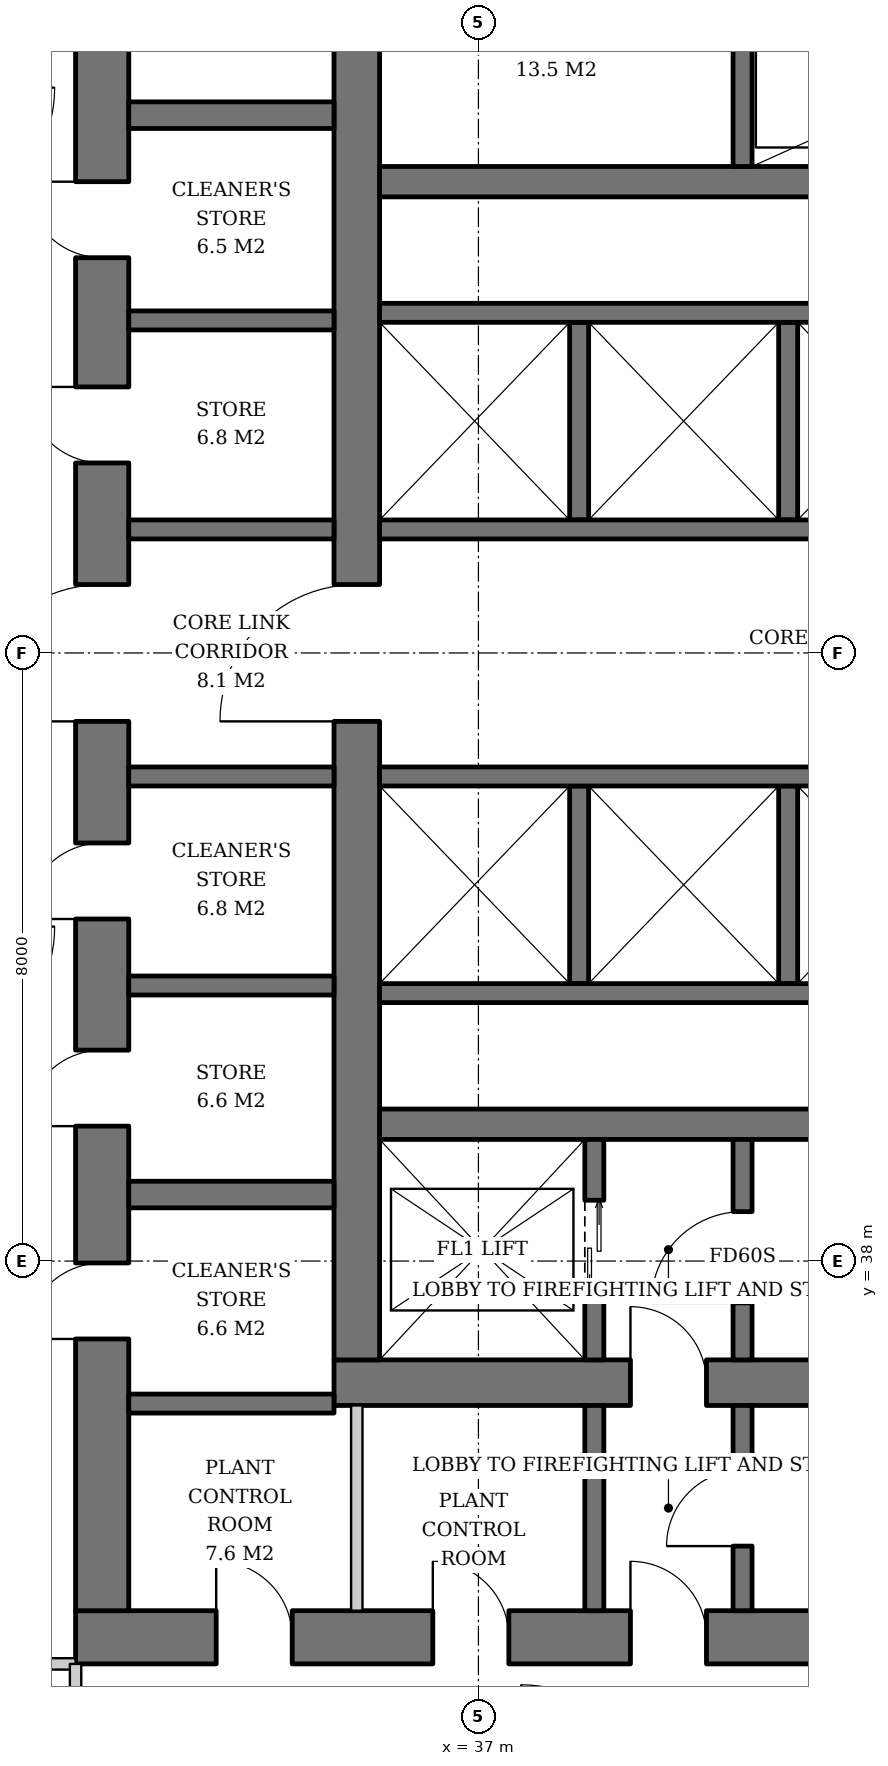
"""IFC4 building model, lengths in metres.
Left out: names, types, materials, properties, quantities, classifications, styles, units other than length and angle.
Written with IfcOpenShell. Run it as: python <this file> out.ifc"""

import sys

from ifc_helpers import new_model, si_unit, direction, frame, frame_2d, origin, origin_2d, place, context, subcontext, project, spatial, rectangle, extrude, element, fill, save


model = new_model("IFC4")
c1 = context("Model", 3, precision=1e-05, world=origin(), true_north=direction((0.0, 1.0)))
c2 = subcontext(c1, "Body", "Model", "MODEL_VIEW")
j1 = project(units=[si_unit("LENGTHUNIT", "METRE"), si_unit("PLANEANGLEUNIT", "RADIAN")], contexts=[c1])
p1 = place(None, origin())
s1 = spatial("IfcSite", under=j1, at=p1, CompositionType="ELEMENT")
p2 = place(p1, origin())
s2 = spatial("IfcBuilding", under=s1, at=p2, CompositionType="ELEMENT")
p3 = place(p2, frame((0.0, 0.0, 157.8)))
s3 = spatial("IfcBuildingStorey", under=s2, at=p3, CompositionType="ELEMENT", Elevation=157.8)
p4 = place(p3, frame((29.471, 30.471, 0.0), z_axis=(0.031898107953, 0.031898107953, 0.998981992539), x_axis=(-0.707106781187, 0.707106781187, 0.0)))
e1 = element("IfcColumn", 1, at=p4, inside=s3, PredefinedType="COLUMN", context=c2, shape_type="SweptSolid", body=[
    extrude(rectangle(XDim=2.6, YDim=2.6, at=origin_2d()), origin(), (0.0, 0.0, 1.0), 3.804),
])
p5 = place(p3, frame((35.1, 36.4, 0.0), z_axis=(0.0, 0.0, 1.0), x_axis=(1.0, 0.0, 0.0)))
e2 = element("IfcWall", 2, at=p5, inside=s3, PredefinedType="SHEAR", context=c2, shape_type="SweptSolid", body=[
    extrude(rectangle(XDim=19.8, YDim=0.6, at=frame_2d((9.9, 0.0))), origin(), (0.0, 0.0, 1.0), 3.8),
])
p6 = place(p5, frame((3.9, 0.0, 0.0)))
e3 = element("IfcOpeningElement", 3, at=p6, cuts=e2, PredefinedType="OPENING", context=c2, shape_type="SweptSolid", body=[
    extrude(rectangle(XDim=1.0, YDim=2.1, at=frame_2d((0.5, 1.05))), frame((0.0, 0.31, 0.0), z_axis=(0.0, -1.0, 0.0), x_axis=(1.0, 0.0, 0.0)), (0.0, 0.0, 1.0), 0.62),
])
p7 = place(p5, frame((15.35, 0.0, 0.0)))
e4 = element("IfcOpeningElement", 4, at=p7, cuts=e2, PredefinedType="OPENING", context=c2, shape_type="SweptSolid", body=[
    extrude(rectangle(XDim=1.0, YDim=2.1, at=frame_2d((0.5, 1.05))), frame((0.0, 0.31, 0.0), z_axis=(0.0, -1.0, 0.0), x_axis=(1.0, 0.0, 0.0)), (0.0, 0.0, 1.0), 0.62),
])
p8 = place(p3, frame((35.4, 36.7, 0.0), z_axis=(0.0, 0.0, 1.0), x_axis=(0.0, 1.0, 0.0)))
e5 = element("IfcWall", 5, at=p8, inside=s3, PredefinedType="SHEAR", context=c2, shape_type="SweptSolid", body=[
    extrude(rectangle(XDim=18.6, YDim=0.6, at=frame_2d((9.3, 0.0))), origin(), (0.0, 0.0, 1.0), 3.8),
])
p9 = place(p8, frame((8.4, 0.0, 0.0)))
e6 = element("IfcOpeningElement", 6, at=p9, cuts=e5, PredefinedType="OPENING", context=c2, shape_type="SweptSolid", body=[
    extrude(rectangle(XDim=1.8, YDim=2.4, at=frame_2d((0.9, 1.2))), frame((0.0, 0.31, 0.0), z_axis=(0.0, -1.0, 0.0), x_axis=(1.0, 0.0, 0.0)), (0.0, 0.0, 1.0), 0.62),
])
p10 = place(p3, frame((31.7, 33.05, 0.0), z_axis=(0.0, 0.0, 1.0), x_axis=(1.0, 0.0, 0.0)))
e7 = element("IfcWall", 7, at=p10, inside=s3, PredefinedType="SHEAR", context=c2, shape_type="SweptSolid", body=[
    extrude(rectangle(XDim=26.6, YDim=0.7, at=frame_2d((13.3, 0.0))), origin(), (0.0, 0.0, 1.0), 3.8),
])
p11 = place(p10, frame((7.3, 0.0, 0.0)))
e8 = element("IfcOpeningElement", 8, at=p11, cuts=e7, PredefinedType="OPENING", context=c2, shape_type="SweptSolid", body=[
    extrude(rectangle(XDim=1.0, YDim=2.1, at=frame_2d((0.5, 1.05))), frame((0.0, 0.36, 0.0), z_axis=(0.0, -1.0, 0.0), x_axis=(1.0, 0.0, 0.0)), (0.0, 0.0, 1.0), 0.72),
])
p12 = place(p10, frame((18.75, 0.0, 0.0)))
e9 = element("IfcOpeningElement", 9, at=p12, cuts=e7, PredefinedType="OPENING", context=c2, shape_type="SweptSolid", body=[
    extrude(rectangle(XDim=1.0, YDim=2.1, at=frame_2d((0.5, 1.05))), frame((0.0, 0.36, 0.0), z_axis=(0.0, -1.0, 0.0), x_axis=(1.0, 0.0, 0.0)), (0.0, 0.0, 1.0), 0.72),
])
p13 = place(p10, frame((1.85, 0.0, 0.0)))
e10 = element("IfcOpeningElement", 10, at=p13, cuts=e7, PredefinedType="OPENING", context=c2, shape_type="SweptSolid", body=[
    extrude(rectangle(XDim=1.0, YDim=2.1, at=frame_2d((0.5, 1.05))), frame((0.0, 0.36, 0.0), z_axis=(0.0, -1.0, 0.0), x_axis=(1.0, 0.0, 0.0)), (0.0, 0.0, 1.0), 0.72),
])
p14 = place(p10, frame((4.7, 0.0, 0.0)))
e11 = element("IfcOpeningElement", 11, at=p14, cuts=e7, PredefinedType="OPENING", context=c2, shape_type="SweptSolid", body=[
    extrude(rectangle(XDim=1.0, YDim=2.1, at=frame_2d((0.5, 1.05))), frame((0.0, 0.36, 0.0), z_axis=(0.0, -1.0, 0.0), x_axis=(1.0, 0.0, 0.0)), (0.0, 0.0, 1.0), 0.72),
])
p15 = place(p3, frame((32.05, 33.4, 0.0), z_axis=(0.0, 0.0, 1.0), x_axis=(0.0, 1.0, 0.0)))
e12 = element("IfcWall", 12, at=p15, inside=s3, PredefinedType="SHEAR", context=c2, shape_type="SweptSolid", body=[
    extrude(rectangle(XDim=25.2, YDim=0.7, at=frame_2d((12.6, 0.0))), origin(), (0.0, 0.0, 1.0), 3.8),
])
p16 = place(p15, frame((11.7, 0.0, 0.0)))
e13 = element("IfcOpeningElement", 13, at=p16, cuts=e12, PredefinedType="OPENING", context=c2, shape_type="SweptSolid", body=[
    extrude(rectangle(XDim=1.8, YDim=2.4, at=frame_2d((0.9, 1.2))), frame((0.0, 0.36, 0.0), z_axis=(0.0, -1.0, 0.0), x_axis=(1.0, 0.0, 0.0)), (0.0, 0.0, 1.0), 0.72),
])
p17 = place(p15, frame((3.575, 0.0, 0.0)))
e14 = element("IfcOpeningElement", 14, at=p17, cuts=e12, PredefinedType="OPENING", context=c2, shape_type="SweptSolid", body=[
    extrude(rectangle(XDim=1.0, YDim=2.1, at=frame_2d((0.5, 1.05))), frame((0.0, 0.36, 0.0), z_axis=(0.0, -1.0, 0.0), x_axis=(1.0, 0.0, 0.0)), (0.0, 0.0, 1.0), 0.72),
])
p18 = place(p15, frame((6.375, 0.0, 0.0)))
e15 = element("IfcOpeningElement", 15, at=p18, cuts=e12, PredefinedType="OPENING", context=c2, shape_type="SweptSolid", body=[
    extrude(rectangle(XDim=1.0, YDim=2.1, at=frame_2d((0.5, 1.05))), frame((0.0, 0.36, 0.0), z_axis=(0.0, -1.0, 0.0), x_axis=(1.0, 0.0, 0.0)), (0.0, 0.0, 1.0), 0.72),
])
p19 = place(p15, frame((9.1, 0.0, 0.0)))
e16 = element("IfcOpeningElement", 16, at=p19, cuts=e12, PredefinedType="OPENING", context=c2, shape_type="SweptSolid", body=[
    extrude(rectangle(XDim=1.0, YDim=2.1, at=frame_2d((0.5, 1.05))), frame((0.0, 0.36, 0.0), z_axis=(0.0, -1.0, 0.0), x_axis=(1.0, 0.0, 0.0)), (0.0, 0.0, 1.0), 0.72),
])
p20 = place(p15, frame((15.1, 0.0, 0.0)))
e17 = element("IfcOpeningElement", 17, at=p20, cuts=e12, PredefinedType="OPENING", context=c2, shape_type="SweptSolid", body=[
    extrude(rectangle(XDim=1.0, YDim=2.1, at=frame_2d((0.5, 1.05))), frame((0.0, 0.36, 0.0), z_axis=(0.0, -1.0, 0.0), x_axis=(1.0, 0.0, 0.0)), (0.0, 0.0, 1.0), 0.72),
])
p21 = place(p15, frame((17.8, 0.0, 0.0)))
e18 = element("IfcOpeningElement", 18, at=p21, cuts=e12, PredefinedType="OPENING", context=c2, shape_type="SweptSolid", body=[
    extrude(rectangle(XDim=1.0, YDim=2.1, at=frame_2d((0.5, 1.05))), frame((0.0, 0.36, 0.0), z_axis=(0.0, -1.0, 0.0), x_axis=(1.0, 0.0, 0.0)), (0.0, 0.0, 1.0), 0.72),
])
for number, where, z_axis, x_axis in (
    (19, (35.7, 39.8, 0.0), (0.0, 0.0, 1.0), (1.0, 0.0, 0.0)),
    (20, (35.7, 52.2, 0.0), (0.0, 0.0, 1.0), (1.0, 0.0, 0.0)),
):
    element("IfcWall", number, at=place(p3, frame(where, z_axis=z_axis, x_axis=x_axis)), inside=s3, PredefinedType="SHEAR", context=c2, shape_type="SweptSolid", body=[
        extrude(rectangle(XDim=18.6, YDim=0.4, at=frame_2d((9.3, 0.0))), origin(), (0.0, 0.0, 1.0), 3.8),
    ])
p22 = place(p3, frame((38.525, 36.7, 0.0), z_axis=(0.0, 0.0, 1.0), x_axis=(0.0, 1.0, 0.0)))
e21 = element("IfcWall", 21, at=p22, inside=s3, PredefinedType="SHEAR", context=c2, shape_type="SweptSolid", body=[
    extrude(rectangle(XDim=2.9, YDim=0.25, at=frame_2d((1.45, 0.0))), origin(), (0.0, 0.0, 1.0), 3.8),
])
p23 = place(p22, frame((0.8, 0.0, 0.0)))
e22 = element("IfcOpeningElement", 22, at=p23, cuts=e21, PredefinedType="OPENING", context=c2, shape_type="SweptSolid", body=[
    extrude(rectangle(XDim=1.3, YDim=2.2, at=frame_2d((0.65, 1.1))), frame((0.0, 0.135, 0.0), z_axis=(0.0, -1.0, 0.0), x_axis=(1.0, 0.0, 0.0)), (0.0, 0.0, 1.0), 0.27),
])
p24 = place(p3, frame((40.475, 36.7, 0.0), z_axis=(0.0, 0.0, 1.0), x_axis=(0.0, 1.0, 0.0)))
e23 = element("IfcWall", 23, at=p24, inside=s3, PredefinedType="SHEAR", context=c2, shape_type="SweptSolid", body=[
    extrude(rectangle(XDim=2.9, YDim=0.25, at=frame_2d((1.45, 0.0))), origin(), (0.0, 0.0, 1.0), 3.8),
])
p25 = place(p24, frame((0.75, 0.0, 0.0)))
e24 = element("IfcOpeningElement", 24, at=p25, cuts=e23, PredefinedType="OPENING", context=c2, shape_type="SweptSolid", body=[
    extrude(rectangle(XDim=1.2, YDim=2.1, at=frame_2d((0.6, 1.05))), frame((0.0, 0.135, 0.0), z_axis=(0.0, -1.0, 0.0), x_axis=(1.0, 0.0, 0.0)), (0.0, 0.0, 1.0), 0.27),
])
p26 = place(p3, frame((40.475, 52.4, 0.0), z_axis=(0.0, 0.0, 1.0), x_axis=(0.0, 1.0, 0.0)))
e25 = element("IfcWall", 25, at=p26, inside=s3, PredefinedType="SHEAR", context=c2, shape_type="SweptSolid", body=[
    extrude(rectangle(XDim=2.9, YDim=0.25, at=frame_2d((1.45, 0.0))), origin(), (0.0, 0.0, 1.0), 3.8),
])
for number, where, z_axis, x_axis in (
    (26, (38.325, 47.75, 0.0), (0.0, 0.0, 1.0), (0.0, 1.0, 0.0)),
    (27, (41.075, 47.75, 0.0), (0.0, 0.0, 1.0), (0.0, 1.0, 0.0)),
):
    element("IfcWall", number, at=place(p3, frame(where, z_axis=z_axis, x_axis=x_axis)), inside=s3, PredefinedType="SHEAR", context=c2, shape_type="SweptSolid", body=[
        extrude(rectangle(XDim=2.6, YDim=0.25, at=frame_2d((1.3, 0.0))), origin(), (0.0, 0.0, 1.0), 3.8),
    ])
p27 = place(p3, frame((35.7, 50.475, 0.0), z_axis=(0.0, 0.0, 1.0), x_axis=(1.0, 0.0, 0.0)))
e28 = element("IfcWall", 28, at=p27, inside=s3, PredefinedType="SHEAR", context=c2, shape_type="SweptSolid", body=[
    extrude(rectangle(XDim=11.0, YDim=0.25, at=frame_2d((5.5, 0.0))), origin(), (0.0, 0.0, 1.0), 3.8),
])
p28 = place(p3, frame((35.7, 47.625, 0.0), z_axis=(0.0, 0.0, 1.0), x_axis=(1.0, 0.0, 0.0)))
e29 = element("IfcWall", 29, at=p28, inside=s3, PredefinedType="SHEAR", context=c2, shape_type="SweptSolid", body=[
    extrude(rectangle(XDim=12.83, YDim=0.25, at=frame_2d((6.415, 0.0))), origin(), (0.0, 0.0, 1.0), 3.8),
])
p29 = place(p28, frame((11.515, 0.0, 0.0)))
e30 = element("IfcOpeningElement", 30, at=p29, cuts=e29, PredefinedType="OPENING", context=c2, shape_type="SweptSolid", body=[
    extrude(rectangle(XDim=0.8, YDim=2.0, at=frame_2d((0.4, 1.0))), frame((0.0, 0.135, 0.0), z_axis=(0.0, -1.0, 0.0), x_axis=(1.0, 0.0, 0.0)), (0.0, 0.0, 1.0), 0.27),
])
for number, where, z_axis, x_axis in (
    (31, (38.325, 44.25, 0.0), (0.0, 0.0, 1.0), (0.0, -1.0, 0.0)),
    (32, (41.075, 44.25, 0.0), (0.0, 0.0, 1.0), (0.0, -1.0, 0.0)),
):
    element("IfcWall", number, at=place(p3, frame(where, z_axis=z_axis, x_axis=x_axis)), inside=s3, PredefinedType="SHEAR", context=c2, shape_type="SweptSolid", body=[
        extrude(rectangle(XDim=2.6, YDim=0.25, at=frame_2d((1.3, 0.0))), origin(), (0.0, 0.0, 1.0), 3.8),
    ])
p30 = place(p3, frame((35.7, 41.525, 0.0), z_axis=(0.0, 0.0, 1.0), x_axis=(1.0, 0.0, 0.0)))
e33 = element("IfcWall", 33, at=p30, inside=s3, PredefinedType="SHEAR", context=c2, shape_type="SweptSolid", body=[
    extrude(rectangle(XDim=11.0, YDim=0.25, at=frame_2d((5.5, 0.0))), origin(), (0.0, 0.0, 1.0), 3.8),
])
p31 = place(p3, frame((35.7, 44.375, 0.0), z_axis=(0.0, 0.0, 1.0), x_axis=(1.0, 0.0, 0.0)))
e34 = element("IfcWall", 34, at=p31, inside=s3, PredefinedType="SHEAR", context=c2, shape_type="SweptSolid", body=[
    extrude(rectangle(XDim=12.83, YDim=0.25, at=frame_2d((6.415, 0.0))), origin(), (0.0, 0.0, 1.0), 3.8),
])
p32 = place(p31, frame((11.515, 0.0, 0.0)))
e35 = element("IfcOpeningElement", 35, at=p32, cuts=e34, PredefinedType="OPENING", context=c2, shape_type="SweptSolid", body=[
    extrude(rectangle(XDim=0.8, YDim=2.0, at=frame_2d((0.4, 1.0))), frame((0.0, 0.135, 0.0), z_axis=(0.0, -1.0, 0.0), x_axis=(1.0, 0.0, 0.0)), (0.0, 0.0, 1.0), 0.27),
])
p33 = place(p3, frame((32.4, 36.125, 0.0), z_axis=(0.0, 0.0, 1.0), x_axis=(1.0, 0.0, 0.0)))
e36 = element("IfcWall", 36, at=p33, inside=s3, PredefinedType="SHEAR", context=c2, shape_type="SweptSolid", body=[
    extrude(rectangle(XDim=2.7, YDim=0.25, at=frame_2d((1.35, 0.0))), origin(), (0.0, 0.0, 1.0), 3.8),
])
p34 = place(p3, frame((32.4, 38.875, 0.0), z_axis=(0.0, 0.0, 1.0), x_axis=(1.0, 0.0, 0.0)))
e37 = element("IfcWall", 37, at=p34, inside=s3, PredefinedType="SHEAR", context=c2, shape_type="SweptSolid", body=[
    extrude(rectangle(XDim=2.7, YDim=0.35, at=frame_2d((1.35, 0.0))), origin(), (0.0, 0.0, 1.0), 3.8),
])
for number, where, z_axis, x_axis in (
    (38, (32.4, 41.625, 0.0), (0.0, 0.0, 1.0), (1.0, 0.0, 0.0)),
    (39, (32.4, 44.375, 0.0), (0.0, 0.0, 1.0), (1.0, 0.0, 0.0)),
    (40, (32.4, 47.625, 0.0), (0.0, 0.0, 1.0), (1.0, 0.0, 0.0)),
    (41, (32.4, 50.375, 0.0), (0.0, 0.0, 1.0), (1.0, 0.0, 0.0)),
):
    element("IfcWall", number, at=place(p3, frame(where, z_axis=z_axis, x_axis=x_axis)), inside=s3, PredefinedType="SHEAR", context=c2, shape_type="SweptSolid", body=[
        extrude(rectangle(XDim=2.7, YDim=0.25, at=frame_2d((1.35, 0.0))), origin(), (0.0, 0.0, 1.0), 3.8),
    ])
p35 = place(p3, frame((32.4, 53.075, 0.0), z_axis=(0.0, 0.0, 1.0), x_axis=(1.0, 0.0, 0.0)))
e42 = element("IfcWall", 42, at=p35, inside=s3, PredefinedType="SHEAR", context=c2, shape_type="SweptSolid", body=[
    extrude(rectangle(XDim=2.7, YDim=0.35, at=frame_2d((1.35, 0.0))), origin(), (0.0, 0.0, 1.0), 3.8),
])
p36 = place(p3, frame((38.525, 33.4, 0.0), z_axis=(0.0, 0.0, 1.0), x_axis=(0.0, 1.0, 0.0)))
e43 = element("IfcWall", 43, at=p36, inside=s3, PredefinedType="SOLIDWALL", context=c2, shape_type="SweptSolid", body=[
    extrude(rectangle(XDim=2.7, YDim=0.25, at=frame_2d((1.35, 0.0))), origin(), (0.0, 0.0, 1.0), 3.52),
])
p37 = place(p3, frame((40.475, 33.4, 0.0), z_axis=(0.0, 0.0, 1.0), x_axis=(0.0, 1.0, 0.0)))
e44 = element("IfcWall", 44, at=p37, inside=s3, PredefinedType="SOLIDWALL", context=c2, shape_type="SweptSolid", body=[
    extrude(rectangle(XDim=2.7, YDim=0.25, at=frame_2d((1.35, 0.0))), origin(), (0.0, 0.0, 1.0), 3.52),
])
p38 = place(p37, frame((0.85, 0.0, 0.0)))
e45 = element("IfcOpeningElement", 45, at=p38, cuts=e44, PredefinedType="OPENING", context=c2, shape_type="SweptSolid", body=[
    extrude(rectangle(XDim=1.0, YDim=2.1, at=frame_2d((0.5, 1.05))), frame((0.0, 0.135, 0.0), z_axis=(0.0, -1.0, 0.0), x_axis=(1.0, 0.0, 0.0)), (0.0, 0.0, 1.0), 0.27),
])
p39 = place(p3, frame((35.4, 33.4, 0.0), z_axis=(0.0, 0.0, 1.0), x_axis=(0.0, 1.0, 0.0)))
e46 = element("IfcWall", 46, at=p39, inside=s3, PredefinedType="SOLIDWALL", context=c2, shape_type="SweptSolid", body=[
    extrude(rectangle(XDim=2.7, YDim=0.15, at=frame_2d((1.35, 0.0))), origin(), (0.0, 0.0, 1.0), 3.52),
])
for number, where, z_axis, x_axis in (
    (47, (31.7, 32.7, 0.0), (0.0, 0.0, 1.0), (-1.0, 0.0, 0.0)),
    (48, (31.7, 32.7, 0.0), (0.0, 0.0, 1.0), (0.0, -1.0, 0.0)),
):
    element("IfcWall", number, at=place(p3, frame(where, z_axis=z_axis, x_axis=x_axis)), inside=s3, PredefinedType="PARTITIONING", context=c2, shape_type="SweptSolid", body=[
        extrude(rectangle(XDim=1.917, YDim=0.15, at=frame_2d((0.958, 0.0))), origin(), (0.0, 0.0, 1.0), 3.52),
    ])
p40 = place(p23, origin())
e49 = element("IfcDoor", 49, at=p40, inside=s3, OperationType="DOUBLE_DOOR_SLIDING", PredefinedType="DOOR", context=c2, shape_type="SweptSolid", body=[
    extrude(rectangle(XDim=1.3, YDim=2.2, at=frame_2d((0.65, 1.1))), frame((0.0, 0.025, 0.0), z_axis=(0.0, -1.0, 0.0), x_axis=(1.0, 0.0, 0.0)), (0.0, 0.0, 1.0), 0.05),
])
fill(e22, e49)
p41 = place(p25, origin())
e50 = element("IfcDoor", 50, at=p41, inside=s3, OperationType="SINGLE_SWING_LEFT", PredefinedType="DOOR", context=c2, shape_type="SweptSolid", body=[
    extrude(rectangle(XDim=1.2, YDim=2.1, at=frame_2d((0.6, 1.05))), frame((0.0, 0.025, 0.0), z_axis=(0.0, -1.0, 0.0), x_axis=(1.0, 0.0, 0.0)), (0.0, 0.0, 1.0), 0.05),
])
fill(e24, e50)
p42 = place(p38, origin())
e51 = element("IfcDoor", 51, at=p42, inside=s3, OperationType="SINGLE_SWING_LEFT", PredefinedType="DOOR", context=c2, shape_type="SweptSolid", body=[
    extrude(rectangle(XDim=1.0, YDim=2.1, at=frame_2d((0.5, 1.05))), frame((0.0, 0.025, 0.0), z_axis=(0.0, -1.0, 0.0), x_axis=(1.0, 0.0, 0.0)), (0.0, 0.0, 1.0), 0.05),
])
fill(e45, e51)
p43 = place(p6, origin())
e52 = element("IfcDoor", 52, at=p43, inside=s3, OperationType="SINGLE_SWING_LEFT", PredefinedType="DOOR", context=c2, shape_type="SweptSolid", body=[
    extrude(rectangle(XDim=1.0, YDim=2.1, at=frame_2d((0.5, 1.05))), frame((0.0, 0.025, 0.0), z_axis=(0.0, -1.0, 0.0), x_axis=(1.0, 0.0, 0.0)), (0.0, 0.0, 1.0), 0.05),
])
fill(e3, e52)
p44 = place(p9, origin())
e53 = element("IfcDoor", 53, at=p44, inside=s3, OperationType="DOUBLE_DOOR_SINGLE_SWING", PredefinedType="DOOR", context=c2, shape_type="SweptSolid", body=[
    extrude(rectangle(XDim=1.8, YDim=2.4, at=frame_2d((0.9, 1.2))), frame((0.0, 0.025, 0.0), z_axis=(0.0, -1.0, 0.0), x_axis=(1.0, 0.0, 0.0)), (0.0, 0.0, 1.0), 0.05),
])
fill(e6, e53)
p45 = place(p16, origin())
e54 = element("IfcDoor", 54, at=p45, inside=s3, OperationType="DOUBLE_DOOR_SINGLE_SWING", PredefinedType="DOOR", context=c2, shape_type="SweptSolid", body=[
    extrude(rectangle(XDim=1.8, YDim=2.4, at=frame_2d((0.9, 1.2))), frame((0.0, 0.025, 0.0), z_axis=(0.0, -1.0, 0.0), x_axis=(1.0, 0.0, 0.0)), (0.0, 0.0, 1.0), 0.05),
])
fill(e13, e54)
p46 = place(p11, origin())
e55 = element("IfcDoor", 55, at=p46, inside=s3, OperationType="SINGLE_SWING_LEFT", PredefinedType="DOOR", context=c2, shape_type="SweptSolid", body=[
    extrude(rectangle(XDim=1.0, YDim=2.1, at=frame_2d((0.5, 1.05))), frame((0.0, 0.025, 0.0), z_axis=(0.0, -1.0, 0.0), x_axis=(1.0, 0.0, 0.0)), (0.0, 0.0, 1.0), 0.05),
])
fill(e8, e55)
p47 = place(p17, origin())
e56 = element("IfcDoor", 56, at=p47, inside=s3, OperationType="SINGLE_SWING_LEFT", PredefinedType="DOOR", context=c2, shape_type="SweptSolid", body=[
    extrude(rectangle(XDim=1.0, YDim=2.1, at=frame_2d((0.5, 1.05))), frame((0.0, -0.29, 0.0), z_axis=(0.0, -1.0, 0.0), x_axis=(1.0, 0.0, 0.0)), (0.0, 0.0, 1.0), 0.05),
])
fill(e14, e56)
p48 = place(p18, origin())
e57 = element("IfcDoor", 57, at=p48, inside=s3, OperationType="SINGLE_SWING_LEFT", PredefinedType="DOOR", context=c2, shape_type="SweptSolid", body=[
    extrude(rectangle(XDim=1.0, YDim=2.1, at=frame_2d((0.5, 1.05))), frame((0.0, -0.29, 0.0), z_axis=(0.0, -1.0, 0.0), x_axis=(1.0, 0.0, 0.0)), (0.0, 0.0, 1.0), 0.05),
])
fill(e15, e57)
p49 = place(p19, origin())
e58 = element("IfcDoor", 58, at=p49, inside=s3, OperationType="SINGLE_SWING_LEFT", PredefinedType="DOOR", context=c2, shape_type="SweptSolid", body=[
    extrude(rectangle(XDim=1.0, YDim=2.1, at=frame_2d((0.5, 1.05))), frame((0.0, -0.29, 0.0), z_axis=(0.0, -1.0, 0.0), x_axis=(1.0, 0.0, 0.0)), (0.0, 0.0, 1.0), 0.05),
])
fill(e16, e58)
p50 = place(p20, origin())
e59 = element("IfcDoor", 59, at=p50, inside=s3, OperationType="SINGLE_SWING_RIGHT", PredefinedType="DOOR", context=c2, shape_type="SweptSolid", body=[
    extrude(rectangle(XDim=1.0, YDim=2.1, at=frame_2d((0.5, 1.05))), frame((0.0, -0.29, 0.0), z_axis=(0.0, -1.0, 0.0), x_axis=(1.0, 0.0, 0.0)), (0.0, 0.0, 1.0), 0.05),
])
fill(e17, e59)
p51 = place(p21, origin())
e60 = element("IfcDoor", 60, at=p51, inside=s3, OperationType="SINGLE_SWING_RIGHT", PredefinedType="DOOR", context=c2, shape_type="SweptSolid", body=[
    extrude(rectangle(XDim=1.0, YDim=2.1, at=frame_2d((0.5, 1.05))), frame((0.0, -0.29, 0.0), z_axis=(0.0, -1.0, 0.0), x_axis=(1.0, 0.0, 0.0)), (0.0, 0.0, 1.0), 0.05),
])
fill(e18, e60)
p52 = place(p13, origin())
e61 = element("IfcDoor", 61, at=p52, inside=s3, OperationType="SINGLE_SWING_LEFT", PredefinedType="DOOR", context=c2, shape_type="SweptSolid", body=[
    extrude(rectangle(XDim=1.0, YDim=2.1, at=frame_2d((0.5, 1.05))), frame((0.0, 0.34, 0.0), z_axis=(0.0, -1.0, 0.0), x_axis=(1.0, 0.0, 0.0)), (0.0, 0.0, 1.0), 0.05),
])
fill(e10, e61)
p53 = place(p14, origin())
e62 = element("IfcDoor", 62, at=p53, inside=s3, OperationType="SINGLE_SWING_LEFT", PredefinedType="DOOR", context=c2, shape_type="SweptSolid", body=[
    extrude(rectangle(XDim=1.0, YDim=2.1, at=frame_2d((0.5, 1.05))), frame((0.0, 0.34, 0.0), z_axis=(0.0, -1.0, 0.0), x_axis=(1.0, 0.0, 0.0)), (0.0, 0.0, 1.0), 0.05),
])
fill(e11, e62)
save(model, sys.argv[1])
